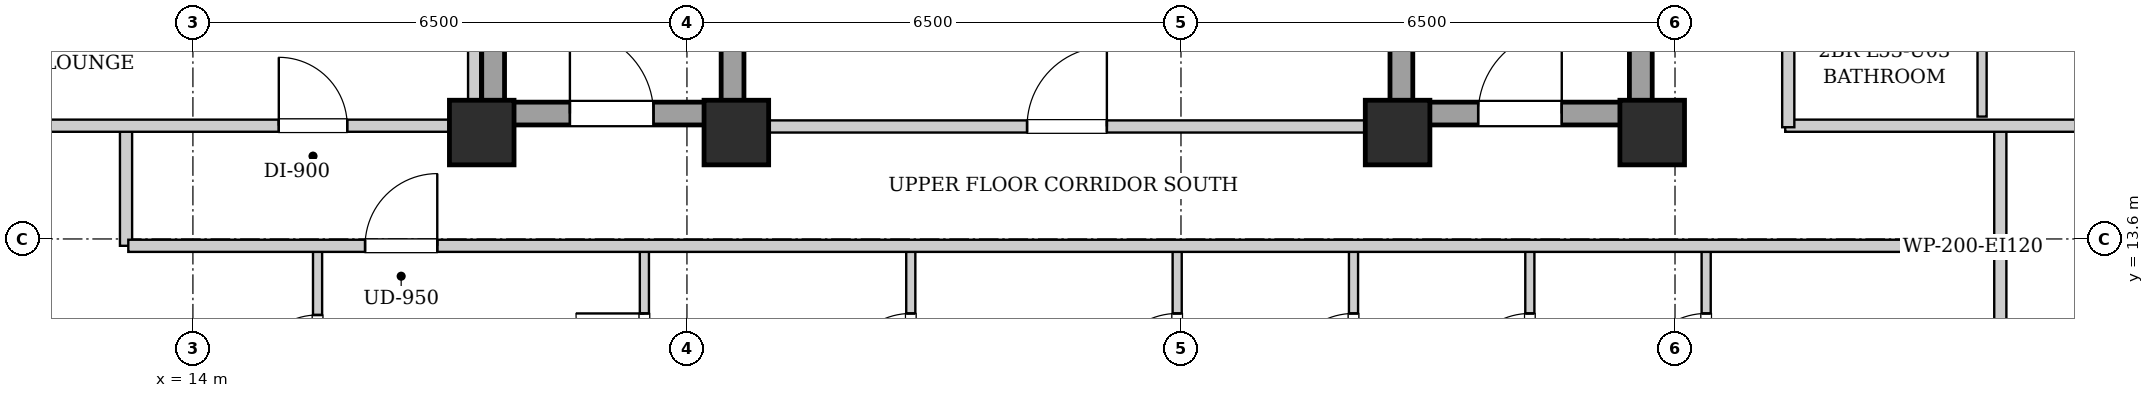
"""IFC4 building model, lengths in metres.
Left out: names, types, materials, properties, quantities, classifications, styles, units other than length and angle.
Written with IfcOpenShell. Run it as: python <this file> out.ifc"""

import sys

from ifc_helpers import new_model, si_unit, direction, frame, frame_2d, origin, origin_2d, place, context, subcontext, project, spatial, rectangle, extrude, element, fill, save


model = new_model("IFC4")
c1 = context("Model", 3, precision=1e-05, world=origin(), true_north=direction((0.0, 1.0)))
c2 = subcontext(c1, "Body", "Model", "MODEL_VIEW")
j1 = project(units=[si_unit("LENGTHUNIT", "METRE"), si_unit("PLANEANGLEUNIT", "RADIAN")], contexts=[c1])
p1 = place(None, origin())
s1 = spatial("IfcSite", under=j1, at=p1, CompositionType="ELEMENT")
p2 = place(p1, origin())
s2 = spatial("IfcBuilding", under=s1, at=p2, CompositionType="ELEMENT")
p3 = place(p2, frame((0.0, 0.0, 184.3)))
s3 = spatial("IfcBuildingStorey", under=s2, at=p3, CompositionType="ELEMENT", Elevation=184.3)
for number, where, z_axis, x_axis in (
    (1, (17.8, 15.0, 0.0), (0.0, 0.0, 1.0), (1.0, 0.0, 0.0)),
    (2, (21.15, 15.0, 0.0), (0.0, 0.0, 1.0), (1.0, 0.0, 0.0)),
    (3, (29.85, 15.0, 0.0), (0.0, 0.0, 1.0), (1.0, 0.0, 0.0)),
    (4, (33.2, 15.0, 0.0), (0.0, 0.0, 1.0), (1.0, 0.0, 0.0)),
):
    element("IfcColumn", number, at=place(p3, frame(where, z_axis=z_axis, x_axis=x_axis)), inside=s3, PredefinedType="COLUMN", context=c2, shape_type="SweptSolid", body=[
        extrude(rectangle(XDim=0.85, YDim=0.85, at=origin_2d()), origin(), (0.0, 0.0, 1.0), 3.3),
    ])
for number, where, z_axis, x_axis in (
    (5, (17.95, 15.1, 0.0), (0.0, 0.0, 1.0), (0.0, 1.0, 0.0)),
    (6, (21.1, 15.1, 0.0), (0.0, 0.0, 1.0), (0.0, 1.0, 0.0)),
):
    element("IfcWall", number, at=place(p3, frame(where, z_axis=z_axis, x_axis=x_axis)), inside=s3, PredefinedType="SHEAR", context=c2, shape_type="SweptSolid", body=[
        extrude(rectangle(XDim=9.0, YDim=0.3, at=frame_2d((4.5, 0.0))), origin(), (0.0, 0.0, 1.0), 3.04),
    ])
p4 = place(p3, frame((18.1, 15.25, 0.0), z_axis=(0.0, 0.0, 1.0), x_axis=(1.0, 0.0, 0.0)))
e7 = element("IfcWall", 7, at=p4, inside=s3, PredefinedType="SHEAR", context=c2, shape_type="SweptSolid", body=[
    extrude(rectangle(XDim=2.85, YDim=0.3, at=frame_2d((1.425, 0.0))), origin(), (0.0, 0.0, 1.0), 3.04),
])
p5 = place(p4, frame((0.86, 0.0, 0.0)))
e8 = element("IfcOpeningElement", 8, at=p5, cuts=e7, PredefinedType="OPENING", context=c2, shape_type="SweptSolid", body=[
    extrude(rectangle(XDim=1.1, YDim=2.05, at=frame_2d((0.55, 1.025))), frame((0.0, 0.16, 0.0), z_axis=(0.0, -1.0, 0.0), x_axis=(1.0, 0.0, 0.0)), (0.0, 0.0, 1.0), 0.32),
])
for number, where, z_axis, x_axis in (
    (9, (29.9, 15.1, 0.0), (0.0, 0.0, 1.0), (0.0, 1.0, 0.0)),
    (10, (33.05, 15.1, 0.0), (0.0, 0.0, 1.0), (0.0, 1.0, 0.0)),
):
    element("IfcWall", number, at=place(p3, frame(where, z_axis=z_axis, x_axis=x_axis)), inside=s3, PredefinedType="SHEAR", context=c2, shape_type="SweptSolid", body=[
        extrude(rectangle(XDim=9.0, YDim=0.3, at=frame_2d((4.5, 0.0))), origin(), (0.0, 0.0, 1.0), 3.04),
    ])
p6 = place(p3, frame((30.05, 15.25, 0.0), z_axis=(0.0, 0.0, 1.0), x_axis=(1.0, 0.0, 0.0)))
e11 = element("IfcWall", 11, at=p6, inside=s3, PredefinedType="SHEAR", context=c2, shape_type="SweptSolid", body=[
    extrude(rectangle(XDim=2.85, YDim=0.3, at=frame_2d((1.425, 0.0))), origin(), (0.0, 0.0, 1.0), 3.04),
])
p7 = place(p6, frame((0.86, 0.0, 0.0)))
e12 = element("IfcOpeningElement", 12, at=p7, cuts=e11, PredefinedType="OPENING", context=c2, shape_type="SweptSolid", body=[
    extrude(rectangle(XDim=1.1, YDim=2.05, at=frame_2d((0.55, 1.025))), frame((0.0, 0.16, 0.0), z_axis=(0.0, -1.0, 0.0), x_axis=(1.0, 0.0, 0.0)), (0.0, 0.0, 1.0), 0.32),
])
p8 = place(p3, frame((21.25, 15.08, 0.0), z_axis=(0.0, 0.0, 1.0), x_axis=(1.0, 0.0, 0.0)))
e13 = element("IfcWall", 13, at=p8, inside=s3, PredefinedType="PARTITIONING", context=c2, shape_type="SweptSolid", body=[
    extrude(rectangle(XDim=8.5, YDim=0.16, at=frame_2d((4.25, 0.0))), origin(), (0.0, 0.0, 1.0), 2.556),
])
p9 = place(p8, frame((3.725, 0.0, 0.0)))
e14 = element("IfcOpeningElement", 14, at=p9, cuts=e13, PredefinedType="OPENING", context=c2, shape_type="SweptSolid", body=[
    extrude(rectangle(XDim=1.05, YDim=2.05, at=frame_2d((0.525, 1.025))), frame((0.0, 0.09, 0.0), z_axis=(0.0, -1.0, 0.0), x_axis=(1.0, 0.0, 0.0)), (0.0, 0.0, 1.0), 0.18),
])
for number, where, z_axis, x_axis in (
    (15, (13.12, 13.51, 0.0), (0.0, 0.0, 1.0), (0.0, 1.0, 0.0)),
    (16, (37.78, 13.51, 0.0), (0.0, 0.0, 1.0), (0.0, 1.0, 0.0)),
):
    element("IfcWall", number, at=place(p3, frame(where, z_axis=z_axis, x_axis=x_axis)), inside=s3, PredefinedType="PARTITIONING", context=c2, shape_type="SweptSolid", body=[
        extrude(rectangle(XDim=1.58, YDim=0.16, at=frame_2d((0.79, 0.0))), origin(), (0.0, 0.0, 1.0), 3.04),
    ])
p10 = place(p3, frame((10.88, 15.09, 0.0), z_axis=(0.0, 0.0, 1.0), x_axis=(1.0, 0.0, 0.0)))
e17 = element("IfcWall", 17, at=p10, inside=s3, PredefinedType="PARTITIONING", context=c2, shape_type="SweptSolid", body=[
    extrude(rectangle(XDim=6.88, YDim=0.16, at=frame_2d((3.44, 0.0))), origin(), (0.0, 0.0, 1.0), 2.556),
])
p11 = place(p10, frame((4.25, 0.0, 0.0)))
e18 = element("IfcOpeningElement", 18, at=p11, cuts=e17, PredefinedType="OPENING", context=c2, shape_type="SweptSolid", body=[
    extrude(rectangle(XDim=0.9, YDim=2.05, at=frame_2d((0.45, 1.025))), frame((0.0, 0.09, 0.0), z_axis=(0.0, -1.0, 0.0), x_axis=(1.0, 0.0, 0.0)), (0.0, 0.0, 1.0), 0.18),
])
p12 = place(p3, frame((34.95, 15.09, 0.0), z_axis=(0.0, 0.0, 1.0), x_axis=(1.0, 0.0, 0.0)))
e19 = element("IfcWall", 19, at=p12, inside=s3, PredefinedType="PARTITIONING", context=c2, shape_type="SweptSolid", body=[
    extrude(rectangle(XDim=5.07, YDim=0.16, at=frame_2d((2.535, 0.0))), origin(), (0.0, 0.0, 1.0), 2.556),
])
p13 = place(p3, frame((37.78, 10.81, 0.0), z_axis=(0.0, 0.0, 1.0), x_axis=(0.0, 1.0, 0.0)))
e20 = element("IfcWall", 20, at=p13, inside=s3, PredefinedType="PARTITIONING", context=c2, shape_type="SweptSolid", body=[
    extrude(rectangle(XDim=2.66, YDim=0.16, at=frame_2d((1.33, 0.0))), origin(), (0.0, 0.0, 1.0), 3.04),
])
p14 = place(p3, frame((15.64, 10.87, 0.0), z_axis=(0.0, 0.0, 1.0), x_axis=(0.0, 1.0, 0.0)))
e21 = element("IfcWall", 21, at=p14, inside=s3, PredefinedType="PARTITIONING", context=c2, shape_type="SweptSolid", body=[
    extrude(rectangle(XDim=2.6, YDim=0.12, at=frame_2d((1.3, 0.0))), origin(), (0.0, 0.0, 1.0), 3.04),
])
p15 = place(p14, frame((0.87, 0.0, 0.0)))
e22 = element("IfcOpeningElement", 22, at=p15, cuts=e21, PredefinedType="OPENING", context=c2, shape_type="SweptSolid", body=[
    extrude(rectangle(XDim=0.86, YDim=2.05, at=frame_2d((0.43, 1.025))), frame((0.0, 0.07, 0.0), z_axis=(0.0, -1.0, 0.0), x_axis=(1.0, 0.0, 0.0)), (0.0, 0.0, 1.0), 0.14),
])
p16 = place(p3, frame((19.94, 10.87, 0.0), z_axis=(0.0, 0.0, 1.0), x_axis=(0.0, 1.0, 0.0)))
e23 = element("IfcWall", 23, at=p16, inside=s3, PredefinedType="PARTITIONING", context=c2, shape_type="SweptSolid", body=[
    extrude(rectangle(XDim=2.6, YDim=0.12, at=frame_2d((1.3, 0.0))), origin(), (0.0, 0.0, 1.0), 3.04),
])
p17 = place(p16, frame((0.85, 0.0, 0.0)))
e24 = element("IfcOpeningElement", 24, at=p17, cuts=e23, PredefinedType="OPENING", context=c2, shape_type="SweptSolid", body=[
    extrude(rectangle(XDim=0.9, YDim=2.05, at=frame_2d((0.45, 1.025))), frame((0.0, 0.07, 0.0), z_axis=(0.0, -1.0, 0.0), x_axis=(1.0, 0.0, 0.0)), (0.0, 0.0, 1.0), 0.14),
])
p18 = place(p3, frame((23.445, 10.87, 0.0), z_axis=(0.0, 0.0, 1.0), x_axis=(0.0, 1.0, 0.0)))
e25 = element("IfcWall", 25, at=p18, inside=s3, PredefinedType="PARTITIONING", context=c2, shape_type="SweptSolid", body=[
    extrude(rectangle(XDim=2.6, YDim=0.12, at=frame_2d((1.3, 0.0))), origin(), (0.0, 0.0, 1.0), 3.04),
])
p19 = place(p18, frame((0.85, 0.0, 0.0)))
e26 = element("IfcOpeningElement", 26, at=p19, cuts=e25, PredefinedType="OPENING", context=c2, shape_type="SweptSolid", body=[
    extrude(rectangle(XDim=0.9, YDim=2.05, at=frame_2d((0.45, 1.025))), frame((0.0, 0.07, 0.0), z_axis=(0.0, -1.0, 0.0), x_axis=(1.0, 0.0, 0.0)), (0.0, 0.0, 1.0), 0.14),
])
p20 = place(p3, frame((26.95, 10.87, 0.0), z_axis=(0.0, 0.0, 1.0), x_axis=(0.0, 1.0, 0.0)))
e27 = element("IfcWall", 27, at=p20, inside=s3, PredefinedType="PARTITIONING", context=c2, shape_type="SweptSolid", body=[
    extrude(rectangle(XDim=2.6, YDim=0.12, at=frame_2d((1.3, 0.0))), origin(), (0.0, 0.0, 1.0), 3.04),
])
p21 = place(p20, frame((0.85, 0.0, 0.0)))
e28 = element("IfcOpeningElement", 28, at=p21, cuts=e27, PredefinedType="OPENING", context=c2, shape_type="SweptSolid", body=[
    extrude(rectangle(XDim=0.9, YDim=2.05, at=frame_2d((0.45, 1.025))), frame((0.0, 0.07, 0.0), z_axis=(0.0, -1.0, 0.0), x_axis=(1.0, 0.0, 0.0)), (0.0, 0.0, 1.0), 0.14),
])
p22 = place(p3, frame((29.27, 10.87, 0.0), z_axis=(0.0, 0.0, 1.0), x_axis=(0.0, 1.0, 0.0)))
e29 = element("IfcWall", 29, at=p22, inside=s3, PredefinedType="PARTITIONING", context=c2, shape_type="SweptSolid", body=[
    extrude(rectangle(XDim=2.6, YDim=0.12, at=frame_2d((1.3, 0.0))), origin(), (0.0, 0.0, 1.0), 3.04),
])
p23 = place(p22, frame((0.85, 0.0, 0.0)))
e30 = element("IfcOpeningElement", 30, at=p23, cuts=e29, PredefinedType="OPENING", context=c2, shape_type="SweptSolid", body=[
    extrude(rectangle(XDim=0.9, YDim=2.05, at=frame_2d((0.45, 1.025))), frame((0.0, 0.07, 0.0), z_axis=(0.0, -1.0, 0.0), x_axis=(1.0, 0.0, 0.0)), (0.0, 0.0, 1.0), 0.14),
])
p24 = place(p3, frame((31.59, 10.87, 0.0), z_axis=(0.0, 0.0, 1.0), x_axis=(0.0, 1.0, 0.0)))
e31 = element("IfcWall", 31, at=p24, inside=s3, PredefinedType="PARTITIONING", context=c2, shape_type="SweptSolid", body=[
    extrude(rectangle(XDim=2.6, YDim=0.12, at=frame_2d((1.3, 0.0))), origin(), (0.0, 0.0, 1.0), 3.04),
])
p25 = place(p24, frame((0.85, 0.0, 0.0)))
e32 = element("IfcOpeningElement", 32, at=p25, cuts=e31, PredefinedType="OPENING", context=c2, shape_type="SweptSolid", body=[
    extrude(rectangle(XDim=0.9, YDim=2.05, at=frame_2d((0.45, 1.025))), frame((0.0, 0.07, 0.0), z_axis=(0.0, -1.0, 0.0), x_axis=(1.0, 0.0, 0.0)), (0.0, 0.0, 1.0), 0.14),
])
p26 = place(p3, frame((33.91, 10.87, 0.0), z_axis=(0.0, 0.0, 1.0), x_axis=(0.0, 1.0, 0.0)))
e33 = element("IfcWall", 33, at=p26, inside=s3, PredefinedType="PARTITIONING", context=c2, shape_type="SweptSolid", body=[
    extrude(rectangle(XDim=2.6, YDim=0.12, at=frame_2d((1.3, 0.0))), origin(), (0.0, 0.0, 1.0), 3.04),
])
p27 = place(p26, frame((0.85, 0.0, 0.0)))
e34 = element("IfcOpeningElement", 34, at=p27, cuts=e33, PredefinedType="OPENING", context=c2, shape_type="SweptSolid", body=[
    extrude(rectangle(XDim=0.9, YDim=2.05, at=frame_2d((0.45, 1.025))), frame((0.0, 0.07, 0.0), z_axis=(0.0, -1.0, 0.0), x_axis=(1.0, 0.0, 0.0)), (0.0, 0.0, 1.0), 0.14),
])
p28 = place(p3, frame((37.54, 15.21, 0.0), z_axis=(0.0, 0.0, 1.0), x_axis=(0.0, 1.0, 0.0)))
e35 = element("IfcWall", 35, at=p28, inside=s3, PredefinedType="PARTITIONING", context=c2, shape_type="SweptSolid", body=[
    extrude(rectangle(XDim=2.3, YDim=0.12, at=frame_2d((1.15, 0.0))), origin(), (0.0, 0.0, 1.0), 3.04),
])
p29 = place(p3, frame((13.15, 13.51, 0.0), z_axis=(0.0, 0.0, 1.0), x_axis=(1.0, 0.0, 0.0)))
e36 = element("IfcWall", 36, at=p29, inside=s3, PredefinedType="PARTITIONING", context=c2, shape_type="SweptSolid", body=[
    extrude(rectangle(XDim=24.6, YDim=0.16, at=frame_2d((12.3, 0.0))), origin(), (0.0, 0.0, 1.0), 3.04),
])
p30 = place(p29, frame((3.115, 0.0, 0.0)))
e37 = element("IfcOpeningElement", 37, at=p30, cuts=e36, PredefinedType="OPENING", context=c2, shape_type="SweptSolid", body=[
    extrude(rectangle(XDim=0.95, YDim=2.1, at=frame_2d((0.475, 1.05))), frame((0.0, 0.09, 0.0), z_axis=(0.0, -1.0, 0.0), x_axis=(1.0, 0.0, 0.0)), (0.0, 0.0, 1.0), 0.18),
])
p31 = place(p3, frame((17.7, 15.02, 0.0), z_axis=(0.0, 0.0, 1.0), x_axis=(0.0, 1.0, 0.0)))
e38 = element("IfcWall", 38, at=p31, inside=s3, PredefinedType="PARTITIONING", context=c2, shape_type="SweptSolid", body=[
    extrude(rectangle(XDim=13.98, YDim=0.16, at=frame_2d((6.99, 0.0))), origin(), (0.0, 0.0, 1.0), 3.04),
])
p32 = place(p3, frame((34.99, 15.07, 0.0), z_axis=(0.0, 0.0, 1.0), x_axis=(0.0, 1.0, 0.0)))
e39 = element("IfcWall", 39, at=p32, inside=s3, PredefinedType="PARTITIONING", context=c2, shape_type="SweptSolid", body=[
    extrude(rectangle(XDim=13.93, YDim=0.16, at=frame_2d((6.965, 0.0))), origin(), (0.0, 0.0, 1.0), 3.04),
])
p33 = place(p32, frame((4.385, 0.0, 0.0)))
e40 = element("IfcOpeningElement", 40, at=p33, cuts=e39, PredefinedType="OPENING", context=c2, shape_type="SweptSolid", body=[
    extrude(rectangle(XDim=0.95, YDim=2.1, at=frame_2d((0.475, 1.05))), frame((0.0, 0.09, 0.0), z_axis=(0.0, -1.0, 0.0), x_axis=(1.0, 0.0, 0.0)), (0.0, 0.0, 1.0), 0.18),
])
p34 = place(p5, origin())
e41 = element("IfcDoor", 41, at=p34, inside=s3, OperationType="SINGLE_SWING_LEFT", PredefinedType="DOOR", context=c2, shape_type="SweptSolid", body=[
    extrude(rectangle(XDim=1.1, YDim=2.05, at=frame_2d((0.55, 1.025))), frame((0.0, 0.025, 0.0), z_axis=(0.0, -1.0, 0.0), x_axis=(1.0, 0.0, 0.0)), (0.0, 0.0, 1.0), 0.05),
])
fill(e8, e41)
p35 = place(p7, origin())
e42 = element("IfcDoor", 42, at=p35, inside=s3, OperationType="SINGLE_SWING_RIGHT", PredefinedType="DOOR", context=c2, shape_type="SweptSolid", body=[
    extrude(rectangle(XDim=1.1, YDim=2.05, at=frame_2d((0.55, 1.025))), frame((0.0, 0.025, 0.0), z_axis=(0.0, -1.0, 0.0), x_axis=(1.0, 0.0, 0.0)), (0.0, 0.0, 1.0), 0.05),
])
fill(e12, e42)
p36 = place(p9, origin())
e43 = element("IfcDoor", 43, at=p36, inside=s3, OperationType="SINGLE_SWING_RIGHT", PredefinedType="DOOR", context=c2, shape_type="SweptSolid", body=[
    extrude(rectangle(XDim=1.05, YDim=2.05, at=frame_2d((0.525, 1.025))), frame((0.0, 0.025, 0.0), z_axis=(0.0, -1.0, 0.0), x_axis=(1.0, 0.0, 0.0)), (0.0, 0.0, 1.0), 0.05),
])
fill(e14, e43)
p37 = place(p11, origin())
e44 = element("IfcDoor", 44, at=p37, inside=s3, OperationType="SINGLE_SWING_LEFT", PredefinedType="DOOR", context=c2, shape_type="SweptSolid", body=[
    extrude(rectangle(XDim=0.9, YDim=2.05, at=frame_2d((0.45, 1.025))), frame((0.0, 0.025, 0.0), z_axis=(0.0, -1.0, 0.0), x_axis=(1.0, 0.0, 0.0)), (0.0, 0.0, 1.0), 0.05),
])
fill(e18, e44)
p38 = place(p15, origin())
e45 = element("IfcDoor", 45, at=p38, inside=s3, OperationType="SINGLE_SWING_LEFT", PredefinedType="DOOR", context=c2, shape_type="SweptSolid", body=[
    extrude(rectangle(XDim=0.86, YDim=2.05, at=frame_2d((0.43, 1.025))), frame((0.0, 0.025, 0.0), z_axis=(0.0, -1.0, 0.0), x_axis=(1.0, 0.0, 0.0)), (0.0, 0.0, 1.0), 0.05),
])
fill(e22, e45)
p39 = place(p17, origin())
e46 = element("IfcDoor", 46, at=p39, inside=s3, OperationType="SINGLE_SWING_RIGHT", PredefinedType="DOOR", context=c2, shape_type="SweptSolid", body=[
    extrude(rectangle(XDim=0.9, YDim=2.05, at=frame_2d((0.45, 1.025))), frame((0.0, 0.025, 0.0), z_axis=(0.0, -1.0, 0.0), x_axis=(1.0, 0.0, 0.0)), (0.0, 0.0, 1.0), 0.05),
])
fill(e24, e46)
p40 = place(p19, origin())
e47 = element("IfcDoor", 47, at=p40, inside=s3, OperationType="SINGLE_SWING_LEFT", PredefinedType="DOOR", context=c2, shape_type="SweptSolid", body=[
    extrude(rectangle(XDim=0.9, YDim=2.05, at=frame_2d((0.45, 1.025))), frame((0.0, 0.025, 0.0), z_axis=(0.0, -1.0, 0.0), x_axis=(1.0, 0.0, 0.0)), (0.0, 0.0, 1.0), 0.05),
])
fill(e26, e47)
p41 = place(p21, origin())
e48 = element("IfcDoor", 48, at=p41, inside=s3, OperationType="SINGLE_SWING_LEFT", PredefinedType="DOOR", context=c2, shape_type="SweptSolid", body=[
    extrude(rectangle(XDim=0.9, YDim=2.05, at=frame_2d((0.45, 1.025))), frame((0.0, 0.025, 0.0), z_axis=(0.0, -1.0, 0.0), x_axis=(1.0, 0.0, 0.0)), (0.0, 0.0, 1.0), 0.05),
])
fill(e28, e48)
p42 = place(p23, origin())
e49 = element("IfcDoor", 49, at=p42, inside=s3, OperationType="SINGLE_SWING_LEFT", PredefinedType="DOOR", context=c2, shape_type="SweptSolid", body=[
    extrude(rectangle(XDim=0.9, YDim=2.05, at=frame_2d((0.45, 1.025))), frame((0.0, 0.025, 0.0), z_axis=(0.0, -1.0, 0.0), x_axis=(1.0, 0.0, 0.0)), (0.0, 0.0, 1.0), 0.05),
])
fill(e30, e49)
p43 = place(p25, origin())
e50 = element("IfcDoor", 50, at=p43, inside=s3, OperationType="SINGLE_SWING_LEFT", PredefinedType="DOOR", context=c2, shape_type="SweptSolid", body=[
    extrude(rectangle(XDim=0.9, YDim=2.05, at=frame_2d((0.45, 1.025))), frame((0.0, 0.025, 0.0), z_axis=(0.0, -1.0, 0.0), x_axis=(1.0, 0.0, 0.0)), (0.0, 0.0, 1.0), 0.05),
])
fill(e32, e50)
p44 = place(p27, origin())
e51 = element("IfcDoor", 51, at=p44, inside=s3, OperationType="SINGLE_SWING_LEFT", PredefinedType="DOOR", context=c2, shape_type="SweptSolid", body=[
    extrude(rectangle(XDim=0.9, YDim=2.05, at=frame_2d((0.45, 1.025))), frame((0.0, 0.025, 0.0), z_axis=(0.0, -1.0, 0.0), x_axis=(1.0, 0.0, 0.0)), (0.0, 0.0, 1.0), 0.05),
])
fill(e34, e51)
p45 = place(p30, origin())
e52 = element("IfcDoor", 52, at=p45, inside=s3, OperationType="SINGLE_SWING_RIGHT", PredefinedType="DOOR", context=c2, shape_type="SweptSolid", body=[
    extrude(rectangle(XDim=0.95, YDim=2.1, at=frame_2d((0.475, 1.05))), frame((0.0, 0.025, 0.0), z_axis=(0.0, -1.0, 0.0), x_axis=(1.0, 0.0, 0.0)), (0.0, 0.0, 1.0), 0.05),
])
fill(e37, e52)
save(model, sys.argv[1])
